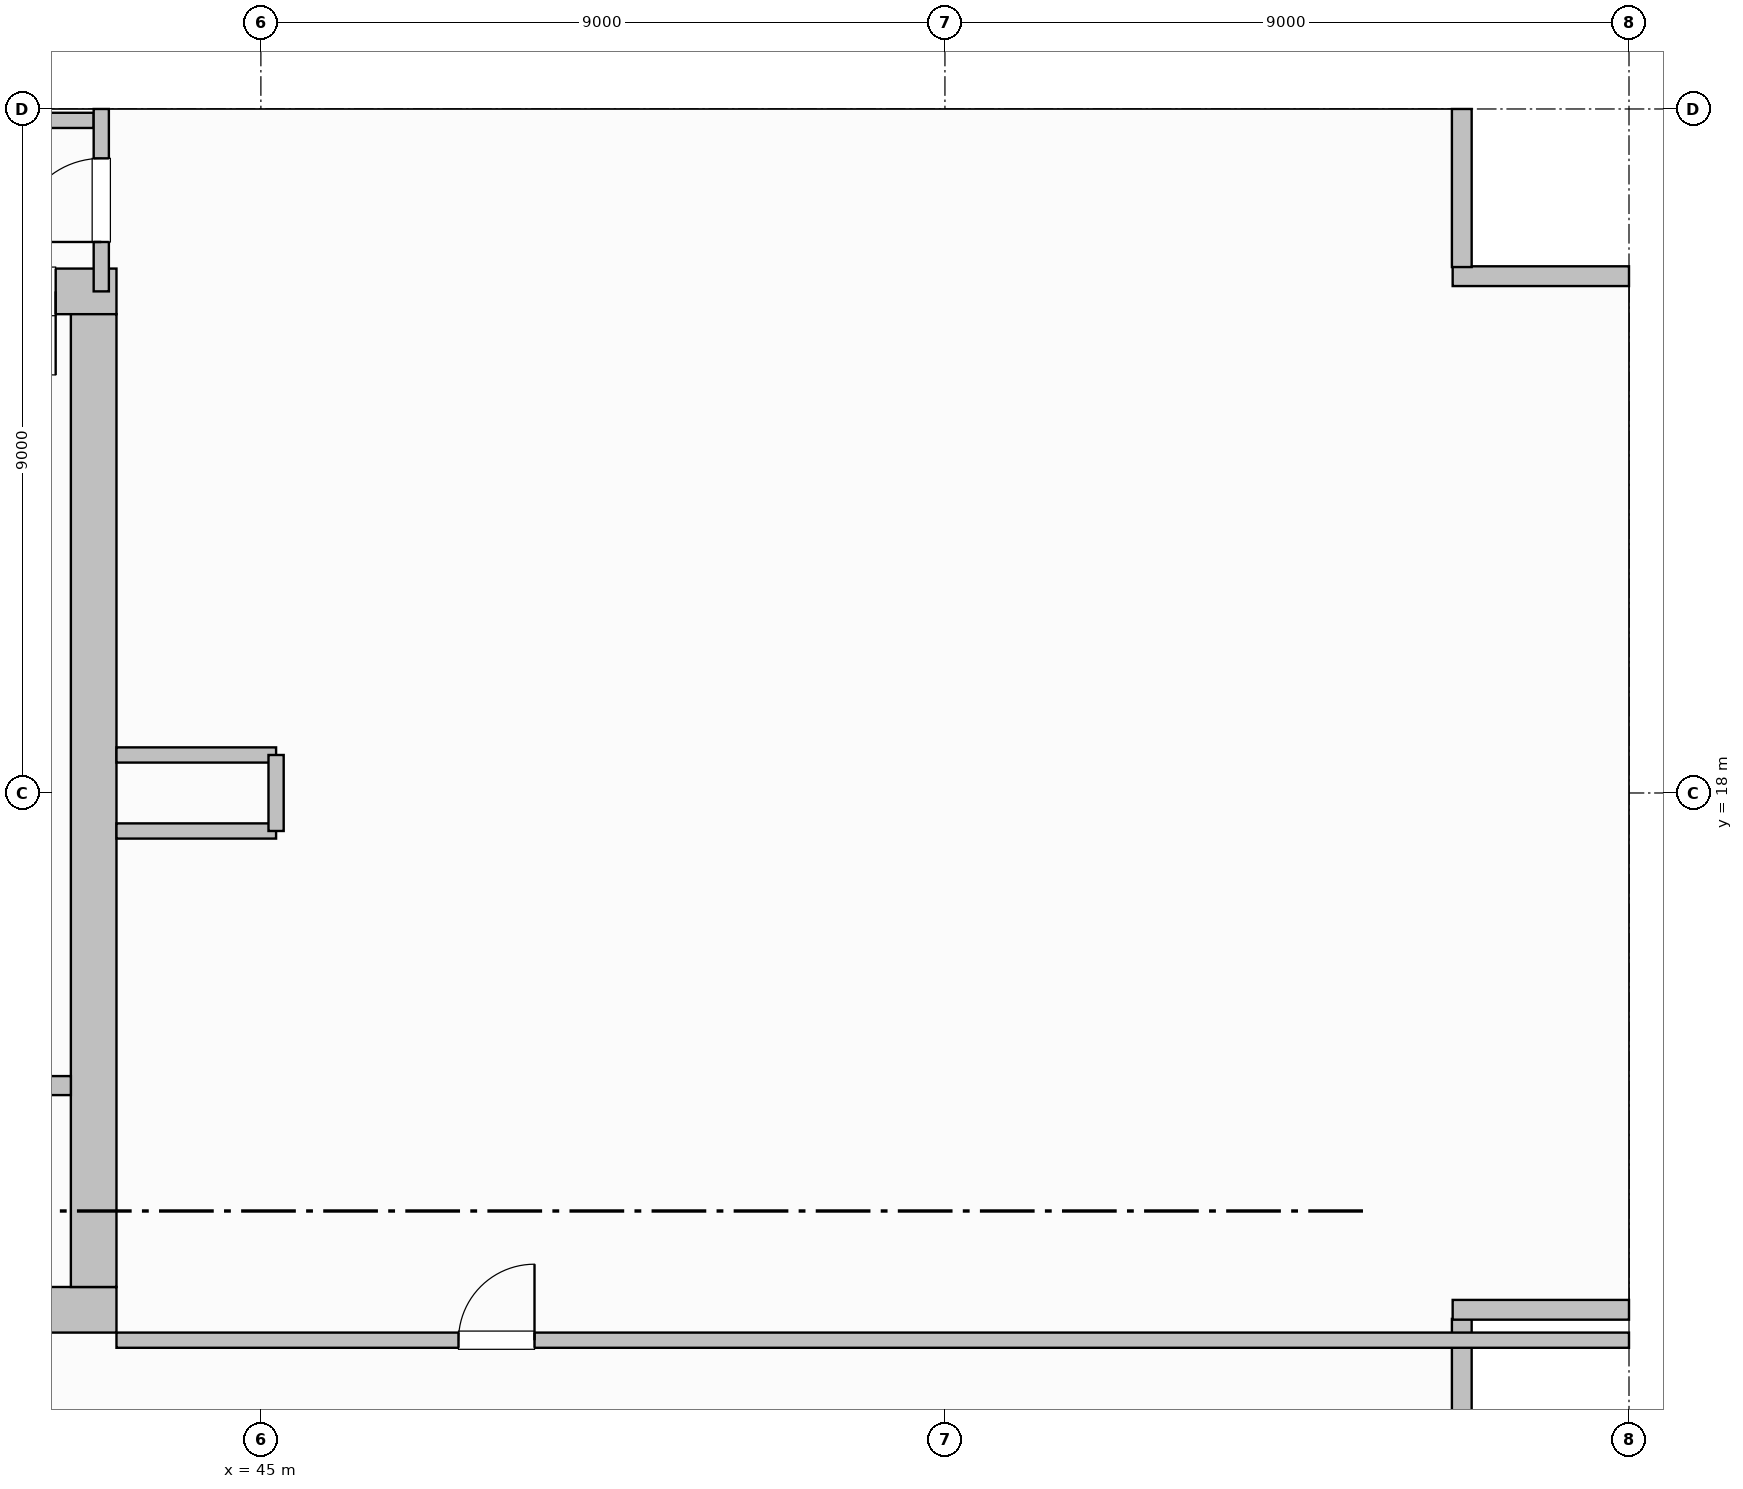
"""IFC4 building model, lengths in metres.
Left out: names, types, materials, properties, quantities, classifications, styles, units other than length and angle.
Written with IfcOpenShell. Run it as: python <this file> out.ifc"""

import sys

from ifc_helpers import new_model, si_unit, direction, frame, frame_2d, origin, origin_2d, place, context, subcontext, project, spatial, rectangle, i_section, extrude, element, fill, save


model = new_model("IFC4")
c1 = context("Model", 3, precision=1e-05, world=origin(), true_north=direction((0.0, 1.0)))
c2 = subcontext(c1, "Body", "Model", "MODEL_VIEW")
j1 = project(units=[si_unit("LENGTHUNIT", "METRE"), si_unit("PLANEANGLEUNIT", "RADIAN")], contexts=[c1])
p1 = place(None, origin())
s1 = spatial("IfcSite", under=j1, at=p1, CompositionType="ELEMENT")
p2 = place(p1, origin())
s2 = spatial("IfcBuilding", under=s1, at=p2, CompositionType="ELEMENT")
p3 = place(p2, frame((0.0, 0.0, 100.2)))
s3 = spatial("IfcBuildingStorey", under=s2, at=p3, CompositionType="ELEMENT", Elevation=100.2)
for number, where, z_axis, x_axis in (
    (1, (45.0, 18.0, 0.0), (0.0, 0.0, 1.0), (1.0, 0.0, 0.0)),
    (2, (45.0, 27.0, 0.0), (0.0, 0.0, 1.0), (1.0, 0.0, 0.0)),
    (3, (54.0, 18.0, 0.0), (0.0, 0.0, 1.0), (1.0, 0.0, 0.0)),
    (4, (54.0, 27.0, 0.0), (0.0, 0.0, 1.0), (1.0, 0.0, 0.0)),
    (5, (63.0, 18.0, 0.0), (0.0, 0.0, 1.0), (1.0, 0.0, 0.0)),
):
    element("IfcColumn", number, at=place(p3, frame(where, z_axis=z_axis, x_axis=x_axis)), inside=s3, PredefinedType="COLUMN", context=c2, shape_type="SweptSolid", body=[
        extrude(i_section(OverallWidth=0.424, OverallDepth=0.474, WebThickness=0.048, FlangeThickness=0.077, FilletRadius=0.015, at=origin_2d()), origin(), (0.0, 0.0, 1.0), 4.8),
    ])
p4 = place(p3, frame((60.8, 9.0, 0.0), z_axis=(0.0, 0.0, 1.0), x_axis=(0.0, 1.0, 0.0)))
e6 = element("IfcWall", 6, at=p4, inside=s3, PredefinedType="SOLIDWALL", context=c2, shape_type="SweptSolid", body=[
    extrude(rectangle(XDim=2.08, YDim=0.26, at=frame_2d((1.04, 0.0))), origin(), (0.0, 0.0, 1.0), 4.47),
])
for number, where, z_axis, x_axis in (
    (7, (60.68, 11.2, 0.0), (0.0, 0.0, 1.0), (1.0, 0.0, 0.0)),
    (8, (63.0, 24.8, 0.0), (0.0, 0.0, 1.0), (-1.0, 0.0, 0.0)),
):
    element("IfcWall", number, at=place(p3, frame(where, z_axis=z_axis, x_axis=x_axis)), inside=s3, PredefinedType="SOLIDWALL", context=c2, shape_type="SweptSolid", body=[
        extrude(rectangle(XDim=2.32, YDim=0.26, at=frame_2d((1.16, 0.0))), origin(), (0.0, 0.0, 1.0), 4.47),
    ])
p5 = place(p3, frame((60.8, 24.92, 0.0), z_axis=(0.0, 0.0, 1.0), x_axis=(0.0, 1.0, 0.0)))
e9 = element("IfcWall", 9, at=p5, inside=s3, PredefinedType="SOLIDWALL", context=c2, shape_type="SweptSolid", body=[
    extrude(rectangle(XDim=2.08, YDim=0.26, at=frame_2d((1.04, 0.0))), origin(), (0.0, 0.0, 1.0), 4.47),
])
p6 = place(p3, frame((29.1, 11.2, 0.0), z_axis=(0.0, 0.0, 1.0), x_axis=(1.0, 0.0, 0.0)))
e10 = element("IfcWall", 10, at=p6, inside=s3, PredefinedType="SHEAR", context=c2, shape_type="SweptSolid", body=[
    extrude(rectangle(XDim=14.0, YDim=0.6, at=frame_2d((7.0, 0.0))), origin(), (0.0, 0.0, 1.0), 4.47),
])
p7 = place(p3, frame((43.1, 24.6, 0.0), z_axis=(0.0, 0.0, 1.0), x_axis=(-1.0, 0.0, 0.0)))
e11 = element("IfcWall", 11, at=p7, inside=s3, PredefinedType="SHEAR", context=c2, shape_type="SweptSolid", body=[
    extrude(rectangle(XDim=14.0, YDim=0.6, at=frame_2d((7.0, 0.0))), origin(), (0.0, 0.0, 1.0), 4.47),
])
p8 = place(p7, frame((0.8, 0.0, 0.0)))
e12 = element("IfcOpeningElement", 12, at=p8, cuts=e11, PredefinedType="OPENING", context=c2, shape_type="SweptSolid", body=[
    extrude(rectangle(XDim=1.1, YDim=2.15, at=frame_2d((0.55, 1.075))), frame((0.0, 0.31, 0.0), z_axis=(0.0, -1.0, 0.0), x_axis=(1.0, 0.0, 0.0)), (0.0, 0.0, 1.0), 0.62),
])
p9 = place(p7, frame((2.3, 0.0, 0.0)))
e13 = element("IfcOpeningElement", 13, at=p9, cuts=e11, PredefinedType="OPENING", context=c2, shape_type="SweptSolid", body=[
    extrude(rectangle(XDim=0.9, YDim=2.1, at=frame_2d((0.45, 1.05))), frame((0.0, 0.31, 0.0), z_axis=(0.0, -1.0, 0.0), x_axis=(1.0, 0.0, 0.0)), (0.0, 0.0, 1.0), 0.62),
])
p10 = place(p7, frame((3.6, 0.0, 0.0)))
e14 = element("IfcOpeningElement", 14, at=p10, cuts=e11, PredefinedType="OPENING", context=c2, shape_type="SweptSolid", body=[
    extrude(rectangle(XDim=0.9, YDim=2.1, at=frame_2d((0.45, 1.05))), frame((0.0, 0.31, 0.0), z_axis=(0.0, -1.0, 0.0), x_axis=(1.0, 0.0, 0.0)), (0.0, 0.0, 1.0), 0.62),
])
p11 = place(p7, frame((4.95, 0.0, 0.0)))
e15 = element("IfcOpeningElement", 15, at=p11, cuts=e11, PredefinedType="OPENING", context=c2, shape_type="SweptSolid", body=[
    extrude(rectangle(XDim=0.9, YDim=2.1, at=frame_2d((0.45, 1.05))), frame((0.0, 0.31, 0.0), z_axis=(0.0, -1.0, 0.0), x_axis=(1.0, 0.0, 0.0)), (0.0, 0.0, 1.0), 0.62),
])
p12 = place(p3, frame((42.8, 11.5, 0.0), z_axis=(0.0, 0.0, 1.0), x_axis=(0.0, 1.0, 0.0)))
e16 = element("IfcWall", 16, at=p12, inside=s3, PredefinedType="SHEAR", context=c2, shape_type="SweptSolid", body=[
    extrude(rectangle(XDim=12.8, YDim=0.6, at=frame_2d((6.4, 0.0))), origin(), (0.0, 0.0, 1.0), 4.47),
])
p13 = place(p3, frame((33.07, 14.15, 0.0), z_axis=(0.0, 0.0, 1.0), x_axis=(1.0, 0.0, 0.0)))
e17 = element("IfcWall", 17, at=p13, inside=s3, PredefinedType="PARTITIONING", context=c2, shape_type="SweptSolid", body=[
    extrude(rectangle(XDim=9.43, YDim=0.25, at=frame_2d((4.715, 0.0))), origin(), (0.0, 0.0, 1.0), 4.47),
])
p14 = place(p13, frame((0.755, 0.0, 0.0)))
e18 = element("IfcOpeningElement", 18, at=p14, cuts=e17, PredefinedType="OPENING", context=c2, shape_type="SweptSolid", body=[
    extrude(rectangle(XDim=1.15, YDim=2.15, at=frame_2d((0.575, 1.075))), frame((0.0, 0.135, 0.0), z_axis=(0.0, -1.0, 0.0), x_axis=(1.0, 0.0, 0.0)), (0.0, 0.0, 1.0), 0.27),
])
p15 = place(p13, frame((3.355, 0.0, 0.0)))
e19 = element("IfcOpeningElement", 19, at=p15, cuts=e17, PredefinedType="OPENING", context=c2, shape_type="SweptSolid", body=[
    extrude(rectangle(XDim=1.15, YDim=2.15, at=frame_2d((0.575, 1.075))), frame((0.0, 0.135, 0.0), z_axis=(0.0, -1.0, 0.0), x_axis=(1.0, 0.0, 0.0)), (0.0, 0.0, 1.0), 0.27),
])
p16 = place(p3, frame((43.1, 10.8, 0.0), z_axis=(0.0, 0.0, 1.0), x_axis=(1.0, 0.0, 0.0)))
e20 = element("IfcWall", 20, at=p16, inside=s3, PredefinedType="PARTITIONING", context=c2, shape_type="SweptSolid", body=[
    extrude(rectangle(XDim=19.9, YDim=0.2, at=frame_2d((9.95, 0.0))), origin(), (0.0, 0.0, 1.0), 3.842),
])
p17 = place(p16, frame((4.5, 0.0, 0.0)))
e21 = element("IfcOpeningElement", 21, at=p17, cuts=e20, PredefinedType="OPENING", context=c2, shape_type="SweptSolid", body=[
    extrude(rectangle(XDim=1.0, YDim=2.15, at=frame_2d((0.5, 1.075))), frame((0.0, 0.11, 0.0), z_axis=(0.0, -1.0, 0.0), x_axis=(1.0, 0.0, 0.0)), (0.0, 0.0, 1.0), 0.22),
])
p18 = place(p3, frame((29.25, 26.85, 0.0), z_axis=(0.0, 0.0, 1.0), x_axis=(1.0, 0.0, 0.0)))
e22 = element("IfcWall", 22, at=p18, inside=s3, PredefinedType="PARTITIONING", context=c2, shape_type="SweptSolid", body=[
    extrude(rectangle(XDim=13.55, YDim=0.2, at=frame_2d((6.775, 0.0))), origin(), (0.0, 0.0, 1.0), 3.677),
])
p19 = place(p3, frame((42.9, 24.6, 0.0), z_axis=(0.0, 0.0, 1.0), x_axis=(0.0, 1.0, 0.0)))
e23 = element("IfcWall", 23, at=p19, inside=s3, PredefinedType="PARTITIONING", context=c2, shape_type="SweptSolid", body=[
    extrude(rectangle(XDim=2.4, YDim=0.2, at=frame_2d((1.2, 0.0))), origin(), (0.0, 0.0, 1.0), 3.677),
])
p20 = place(p19, frame((0.65, 0.0, 0.0)))
e24 = element("IfcOpeningElement", 24, at=p20, cuts=e23, PredefinedType="OPENING", context=c2, shape_type="SweptSolid", body=[
    extrude(rectangle(XDim=1.1, YDim=2.15, at=frame_2d((0.55, 1.075))), frame((0.0, 0.11, 0.0), z_axis=(0.0, -1.0, 0.0), x_axis=(1.0, 0.0, 0.0)), (0.0, 0.0, 1.0), 0.22),
])
for number, where, z_axis, x_axis in (
    (25, (43.1, 18.5, 0.0), (0.0, 0.0, 1.0), (1.0, 0.0, 0.0)),
    (26, (43.1, 17.5, 0.0), (0.0, 0.0, 1.0), (1.0, 0.0, 0.0)),
):
    element("IfcWall", number, at=place(p3, frame(where, z_axis=z_axis, x_axis=x_axis)), inside=s3, PredefinedType="PARTITIONING", context=c2, shape_type="SweptSolid", body=[
        extrude(rectangle(XDim=2.1, YDim=0.2, at=frame_2d((1.05, 0.0))), origin(), (0.0, 0.0, 1.0), 3.842),
    ])
p21 = place(p3, frame((45.2, 17.5, 0.0), z_axis=(0.0, 0.0, 1.0), x_axis=(0.0, 1.0, 0.0)))
e27 = element("IfcWall", 27, at=p21, inside=s3, PredefinedType="PARTITIONING", context=c2, shape_type="SweptSolid", body=[
    extrude(rectangle(XDim=1.0, YDim=0.2, at=frame_2d((0.5, 0.0))), origin(), (0.0, 0.0, 1.0), 3.839),
])
p22 = place(p8, origin())
e28 = element("IfcDoor", 28, at=p22, inside=s3, OperationType="SINGLE_SWING_LEFT", PredefinedType="DOOR", context=c2, shape_type="SweptSolid", body=[
    extrude(rectangle(XDim=1.1, YDim=2.15, at=frame_2d((0.55, 1.075))), frame((0.0, 0.025, 0.0), z_axis=(0.0, -1.0, 0.0), x_axis=(1.0, 0.0, 0.0)), (0.0, 0.0, 1.0), 0.05),
])
fill(e12, e28)
p23 = place(p20, origin())
e29 = element("IfcDoor", 29, at=p23, inside=s3, OperationType="SINGLE_SWING_LEFT", PredefinedType="DOOR", context=c2, shape_type="SweptSolid", body=[
    extrude(rectangle(XDim=1.1, YDim=2.15, at=frame_2d((0.55, 1.075))), frame((0.0, 0.025, 0.0), z_axis=(0.0, -1.0, 0.0), x_axis=(1.0, 0.0, 0.0)), (0.0, 0.0, 1.0), 0.05),
])
fill(e24, e29)
p24 = place(p17, origin())
e30 = element("IfcDoor", 30, at=p24, inside=s3, OperationType="SINGLE_SWING_RIGHT", PredefinedType="DOOR", context=c2, shape_type="SweptSolid", body=[
    extrude(rectangle(XDim=1.0, YDim=2.15, at=frame_2d((0.5, 1.075))), frame((0.0, 0.025, 0.0), z_axis=(0.0, -1.0, 0.0), x_axis=(1.0, 0.0, 0.0)), (0.0, 0.0, 1.0), 0.05),
])
fill(e21, e30)
save(model, sys.argv[1])
